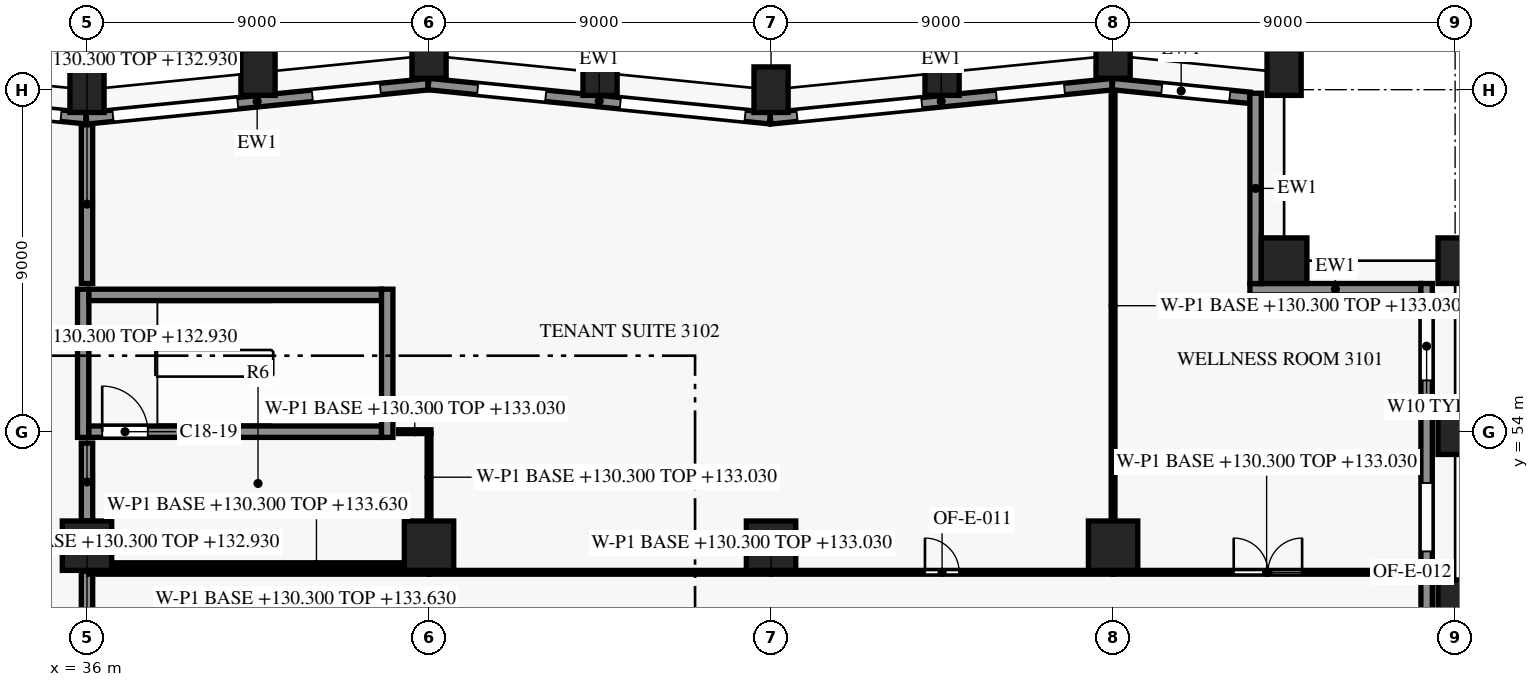
"""IFC4 building model, lengths in metres.
Left out: names, types, materials, properties, quantities, classifications, styles, units other than length and angle.
Written with IfcOpenShell. Run it as: python <this file> out.ifc"""

import sys

from ifc_helpers import new_model, si_unit, direction, frame, frame_2d, origin, origin_2d, place, context, subcontext, project, spatial, rectangle, extrude, element, fill, save


model = new_model("IFC4")
c1 = context("Model", 3, precision=1e-05, world=origin(), true_north=direction((0.0, 1.0)))
c2 = subcontext(c1, "Body", "Model", "MODEL_VIEW")
j1 = project(units=[si_unit("LENGTHUNIT", "METRE"), si_unit("PLANEANGLEUNIT", "RADIAN")], contexts=[c1])
p1 = place(None, origin())
s1 = spatial("IfcSite", under=j1, at=p1, CompositionType="ELEMENT")
p2 = place(p1, origin())
s2 = spatial("IfcBuilding", under=s1, at=p2, CompositionType="ELEMENT")
p3 = place(p2, frame((0.0, 0.0, 130.3)))
s3 = spatial("IfcBuildingStorey", under=s2, at=p3, CompositionType="ELEMENT", Elevation=130.3)
for number, where, z_axis, x_axis in (
    (1, (72.0, 49.5, 0.0), (0.0, 0.0, 1.0), (0.0, 1.0, 0.0)),
    (2, (72.0, 54.0, 0.0), (0.0, 0.0, 1.0), (0.0, 1.0, 0.0)),
    (3, (72.0, 58.5, 0.0), (0.0, 0.0, 1.0), (0.0, 1.0, 0.0)),
    (4, (67.5, 63.45, 0.0), (0.0, 0.0, 1.0), (-0.995, 0.1, 0.0)),
    (5, (63.0, 63.9, 0.0), (0.0, 0.0, 1.0), (-1.0, 0.0, 0.0)),
    (6, (58.5, 63.45, 0.0), (0.0, 0.0, 1.0), (-0.995, -0.1, 0.0)),
    (7, (54.0, 63.0, 0.0), (0.0, 0.0, 1.0), (-1.0, 0.0, 0.0)),
    (8, (49.5, 63.45, 0.0), (0.0, 0.0, 1.0), (-0.995, 0.1, 0.0)),
    (9, (45.0, 63.9, 0.0), (0.0, 0.0, 1.0), (-1.0, 0.0, 0.0)),
    (10, (40.5, 63.45, 0.0), (0.0, 0.0, 1.0), (-0.995, -0.1, 0.0)),
    (11, (36.0, 63.0, 0.0), (0.0, 0.0, 1.0), (-1.0, 0.0, 0.0)),
):
    element("IfcColumn", number, at=place(p3, frame(where, z_axis=z_axis, x_axis=x_axis)), inside=s3, PredefinedType="COLUMN", context=c2, shape_type="SweptSolid", body=[
        extrude(rectangle(XDim=0.9, YDim=1.2, at=origin_2d()), origin(), (0.0, 0.0, 1.0), 3.8),
    ])
p4 = place(p3, frame((67.5, 58.5, 0.0), z_axis=(0.0, 0.0, 1.0), x_axis=(1.0, 0.0, 0.0)))
e12 = element("IfcColumn", 12, at=p4, inside=s3, PredefinedType="COLUMN", context=c2, shape_type="SweptSolid", body=[
    extrude(rectangle(XDim=1.2, YDim=1.2, at=origin_2d()), origin(), (0.0, 0.0, 1.0), 3.8),
])
for number, where, z_axis, x_axis in (
    (13, (36.0, 51.0, 0.0), (0.0, 0.0, 1.0), (1.0, 0.0, 0.0)),
    (14, (45.0, 51.0, 0.0), (0.0, 0.0, 1.0), (1.0, 0.0, 0.0)),
    (15, (54.0, 51.0, 0.0), (0.0, 0.0, 1.0), (1.0, 0.0, 0.0)),
    (16, (63.0, 51.0, 0.0), (0.0, 0.0, 1.0), (1.0, 0.0, 0.0)),
):
    element("IfcColumn", number, at=place(p3, frame(where, z_axis=z_axis, x_axis=x_axis)), inside=s3, PredefinedType="COLUMN", context=c2, shape_type="SweptSolid", body=[
        extrude(rectangle(XDim=1.3, YDim=1.3, at=origin_2d()), origin(), (0.0, 0.0, 1.0), 3.8),
    ])
p5 = place(p3, frame((71.25, 57.9, 0.0), z_axis=(0.0, 0.0, 1.0), x_axis=(0.0, -1.0, 0.0)))
e17 = element("IfcWall", 17, at=p5, inside=s3, PredefinedType="SOLIDWALL", context=c2, shape_type="SweptSolid", body=[
    extrude(rectangle(XDim=25.502, YDim=0.3, at=frame_2d((12.751, 0.0))), origin(), (0.0, 0.0, 1.0), 3.15),
])
p6 = place(p5, frame((0.75, 0.0, 0.75)))
e18 = element("IfcOpeningElement", 18, at=p6, cuts=e17, PredefinedType="OPENING", context=c2, shape_type="SweptSolid", body=[
    extrude(rectangle(XDim=1.8, YDim=1.8, at=frame_2d((0.9, 0.9))), frame((0.0, 0.16, 0.0), z_axis=(0.0, -1.0, 0.0), x_axis=(1.0, 0.0, 0.0)), (0.0, 0.0, 1.0), 0.32),
])
p7 = place(p5, frame((5.25, 0.0, 0.75)))
e19 = element("IfcOpeningElement", 19, at=p7, cuts=e17, PredefinedType="OPENING", context=c2, shape_type="SweptSolid", body=[
    extrude(rectangle(XDim=1.8, YDim=1.8, at=frame_2d((0.9, 0.9))), frame((0.0, 0.16, 0.0), z_axis=(0.0, -1.0, 0.0), x_axis=(1.0, 0.0, 0.0)), (0.0, 0.0, 1.0), 0.32),
])
p8 = place(p5, frame((9.0, 0.0, 0.15)))
e20 = element("IfcOpeningElement", 20, at=p8, cuts=e17, PredefinedType="OPENING", context=c2, shape_type="SweptSolid", body=[
    extrude(rectangle(XDim=3.3, YDim=2.4, at=frame_2d((1.65, 1.2))), frame((0.0, 0.16, 0.0), z_axis=(0.0, -1.0, 0.0), x_axis=(1.0, 0.0, 0.0)), (0.0, 0.0, 1.0), 0.32),
])
p9 = place(p5, frame((13.5, 0.0, 0.15)))
e21 = element("IfcOpeningElement", 21, at=p9, cuts=e17, PredefinedType="OPENING", context=c2, shape_type="SweptSolid", body=[
    extrude(rectangle(XDim=3.3, YDim=2.4, at=frame_2d((1.65, 1.2))), frame((0.0, 0.16, 0.0), z_axis=(0.0, -1.0, 0.0), x_axis=(1.0, 0.0, 0.0)), (0.0, 0.0, 1.0), 0.32),
])
p10 = place(p5, frame((18.75, 0.0, 0.75)))
e22 = element("IfcOpeningElement", 22, at=p10, cuts=e17, PredefinedType="OPENING", context=c2, shape_type="SweptSolid", body=[
    extrude(rectangle(XDim=1.8, YDim=1.8, at=frame_2d((0.9, 0.9))), frame((0.0, 0.16, 0.0), z_axis=(0.0, -1.0, 0.0), x_axis=(1.0, 0.0, 0.0)), (0.0, 0.0, 1.0), 0.32),
])
p11 = place(p5, frame((23.25, 0.0, 0.75)))
e23 = element("IfcOpeningElement", 23, at=p11, cuts=e17, PredefinedType="OPENING", context=c2, shape_type="SweptSolid", body=[
    extrude(rectangle(XDim=1.8, YDim=1.8, at=frame_2d((0.9, 0.9))), frame((0.0, 0.16, 0.0), z_axis=(0.0, -1.0, 0.0), x_axis=(1.0, 0.0, 0.0)), (0.0, 0.0, 1.0), 0.32),
])
p12 = place(p3, frame((66.6, 57.75, 0.0), z_axis=(0.0, 0.0, 1.0), x_axis=(1.0, 0.0, 0.0)))
e24 = element("IfcWall", 24, at=p12, inside=s3, PredefinedType="SOLIDWALL", context=c2, shape_type="SweptSolid", body=[
    extrude(rectangle(XDim=4.5, YDim=0.3, at=frame_2d((2.25, 0.0))), origin(), (0.0, 0.0, 1.0), 3.15),
])
p13 = place(p3, frame((66.75, 62.907, 0.0), z_axis=(0.0, 0.0, 1.0), x_axis=(0.0, -1.0, 0.0)))
e25 = element("IfcWall", 25, at=p13, inside=s3, PredefinedType="SOLIDWALL", context=c2, shape_type="SweptSolid", body=[
    extrude(rectangle(XDim=5.009, YDim=0.3, at=frame_2d((2.504, 0.0))), origin(), (0.0, 0.0, 1.0), 3.15),
])
p14 = place(p3, frame((62.985, 63.148, 0.0), z_axis=(0.0, 0.0, 1.0), x_axis=(0.995038521274, -0.099490407478, 0.0)))
e26 = element("IfcWall", 26, at=p14, inside=s3, PredefinedType="SOLIDWALL", context=c2, shape_type="SweptSolid", body=[
    extrude(rectangle(XDim=3.632, YDim=0.3, at=frame_2d((1.816, 0.0))), origin(), (0.0, 0.0, 1.0), 3.15),
])
p15 = place(p14, frame((1.301, 0.0, 0.75)))
e27 = element("IfcOpeningElement", 27, at=p15, cuts=e26, PredefinedType="OPENING", context=c2, shape_type="SweptSolid", body=[
    extrude(rectangle(XDim=1.8, YDim=1.8, at=frame_2d((0.9, 0.9))), frame((0.0, 0.16, 0.0), z_axis=(0.0, -1.0, 0.0), x_axis=(1.0, 0.0, 0.0)), (0.0, 0.0, 1.0), 0.32),
])
p16 = place(p3, frame((53.985, 62.245, 0.0), z_axis=(0.0, 0.0, 1.0), x_axis=(0.995037993253, 0.099495688264, 0.0)))
e28 = element("IfcWall", 28, at=p16, inside=s3, PredefinedType="SOLIDWALL", context=c2, shape_type="SweptSolid", body=[
    extrude(rectangle(XDim=9.03, YDim=0.3, at=frame_2d((4.515, 0.0))), origin(), (0.0, 0.0, 1.0), 3.15),
])
p17 = place(p16, frame((0.701, 0.0, 0.15)))
e29 = element("IfcOpeningElement", 29, at=p17, cuts=e28, PredefinedType="OPENING", context=c2, shape_type="SweptSolid", body=[
    extrude(rectangle(XDim=3.3, YDim=2.4, at=frame_2d((1.65, 1.2))), frame((0.0, 0.16, 0.0), z_axis=(0.0, -1.0, 0.0), x_axis=(1.0, 0.0, 0.0)), (0.0, 0.0, 1.0), 0.32),
])
p18 = place(p16, frame((5.974, 0.0, 0.75)))
e30 = element("IfcOpeningElement", 30, at=p18, cuts=e28, PredefinedType="OPENING", context=c2, shape_type="SweptSolid", body=[
    extrude(rectangle(XDim=1.8, YDim=1.8, at=frame_2d((0.9, 0.9))), frame((0.0, 0.16, 0.0), z_axis=(0.0, -1.0, 0.0), x_axis=(1.0, 0.0, 0.0)), (0.0, 0.0, 1.0), 0.32),
])
p19 = place(p3, frame((44.985, 63.148, 0.0), z_axis=(0.0, 0.0, 1.0), x_axis=(0.995037993253, -0.099495688264, 0.0)))
e31 = element("IfcWall", 31, at=p19, inside=s3, PredefinedType="SOLIDWALL", context=c2, shape_type="SweptSolid", body=[
    extrude(rectangle(XDim=9.03, YDim=0.3, at=frame_2d((4.515, 0.0))), origin(), (0.0, 0.0, 1.0), 3.15),
])
p20 = place(p19, frame((1.301, 0.0, 0.75)))
e32 = element("IfcOpeningElement", 32, at=p20, cuts=e31, PredefinedType="OPENING", context=c2, shape_type="SweptSolid", body=[
    extrude(rectangle(XDim=1.8, YDim=1.8, at=frame_2d((0.9, 0.9))), frame((0.0, 0.16, 0.0), z_axis=(0.0, -1.0, 0.0), x_axis=(1.0, 0.0, 0.0)), (0.0, 0.0, 1.0), 0.32),
])
p21 = place(p19, frame((5.073, 0.0, 0.15)))
e33 = element("IfcOpeningElement", 33, at=p21, cuts=e31, PredefinedType="OPENING", context=c2, shape_type="SweptSolid", body=[
    extrude(rectangle(XDim=3.3, YDim=2.4, at=frame_2d((1.65, 1.2))), frame((0.0, 0.16, 0.0), z_axis=(0.0, -1.0, 0.0), x_axis=(1.0, 0.0, 0.0)), (0.0, 0.0, 1.0), 0.32),
])
p22 = place(p3, frame((35.985, 62.245, 0.0), z_axis=(0.0, 0.0, 1.0), x_axis=(0.995037993253, 0.099495688264, 0.0)))
e34 = element("IfcWall", 34, at=p22, inside=s3, PredefinedType="SOLIDWALL", context=c2, shape_type="SweptSolid", body=[
    extrude(rectangle(XDim=9.03, YDim=0.3, at=frame_2d((4.515, 0.0))), origin(), (0.0, 0.0, 1.0), 3.15),
])
p23 = place(p22, frame((0.701, 0.0, 0.15)))
e35 = element("IfcOpeningElement", 35, at=p23, cuts=e34, PredefinedType="OPENING", context=c2, shape_type="SweptSolid", body=[
    extrude(rectangle(XDim=3.3, YDim=2.4, at=frame_2d((1.65, 1.2))), frame((0.0, 0.16, 0.0), z_axis=(0.0, -1.0, 0.0), x_axis=(1.0, 0.0, 0.0)), (0.0, 0.0, 1.0), 0.32),
])
p24 = place(p22, frame((5.974, 0.0, 0.75)))
e36 = element("IfcOpeningElement", 36, at=p24, cuts=e34, PredefinedType="OPENING", context=c2, shape_type="SweptSolid", body=[
    extrude(rectangle(XDim=1.8, YDim=1.8, at=frame_2d((0.9, 0.9))), frame((0.0, 0.16, 0.0), z_axis=(0.0, -1.0, 0.0), x_axis=(1.0, 0.0, 0.0)), (0.0, 0.0, 1.0), 0.32),
])
p25 = place(p3, frame((27.075, 63.139, 0.0), z_axis=(0.0, 0.0, 1.0), x_axis=(0.995036108601, -0.099514534519, 0.0)))
e37 = element("IfcWall", 37, at=p25, inside=s3, PredefinedType="SOLIDWALL", context=c2, shape_type="SweptSolid", body=[
    extrude(rectangle(XDim=8.94, YDim=0.3, at=frame_2d((4.47, 0.0))), origin(), (0.0, 0.0, 1.0), 3.15),
])
p26 = place(p25, frame((1.211, 0.0, 0.75)))
e38 = element("IfcOpeningElement", 38, at=p26, cuts=e37, PredefinedType="OPENING", context=c2, shape_type="SweptSolid", body=[
    extrude(rectangle(XDim=1.8, YDim=1.8, at=frame_2d((0.9, 0.9))), frame((0.0, 0.16, 0.0), z_axis=(0.0, -1.0, 0.0), x_axis=(1.0, 0.0, 0.0)), (0.0, 0.0, 1.0), 0.32),
])
p27 = place(p25, frame((4.984, 0.0, 0.15)))
e39 = element("IfcOpeningElement", 39, at=p27, cuts=e37, PredefinedType="OPENING", context=c2, shape_type="SweptSolid", body=[
    extrude(rectangle(XDim=3.3, YDim=2.4, at=frame_2d((1.65, 1.2))), frame((0.0, 0.16, 0.0), z_axis=(0.0, -1.0, 0.0), x_axis=(1.0, 0.0, 0.0)), (0.0, 0.0, 1.0), 0.32),
])
p28 = place(p3, frame((36.05, 54.0, 0.0), z_axis=(0.0, 0.0, 1.0), x_axis=(1.0, 0.0, 0.0)))
e40 = element("IfcWall", 40, at=p28, inside=s3, PredefinedType="SHEAR", context=c2, shape_type="SweptSolid", body=[
    extrude(rectangle(XDim=7.7, YDim=0.3, at=frame_2d((3.85, 0.0))), origin(), (0.0, 0.0, 1.0), 3.5),
])
p29 = place(p28, frame((0.35, 0.0, 0.0)))
e41 = element("IfcOpeningElement", 41, at=p29, cuts=e40, PredefinedType="OPENING", context=c2, shape_type="SweptSolid", body=[
    extrude(rectangle(XDim=1.2, YDim=2.2, at=frame_2d((0.6, 1.1))), frame((0.0, 0.16, 0.0), z_axis=(0.0, -1.0, 0.0), x_axis=(1.0, 0.0, 0.0)), (0.0, 0.0, 1.0), 0.32),
])
p30 = place(p3, frame((36.05, 57.6, 0.0), z_axis=(0.0, 0.0, 1.0), x_axis=(1.0, 0.0, 0.0)))
e42 = element("IfcWall", 42, at=p30, inside=s3, PredefinedType="SHEAR", context=c2, shape_type="SweptSolid", body=[
    extrude(rectangle(XDim=7.7, YDim=0.3, at=frame_2d((3.85, 0.0))), origin(), (0.0, 0.0, 1.0), 3.5),
])
for number, where, z_axis, x_axis in (
    (43, (35.9, 53.85, 0.0), (0.0, 0.0, 1.0), (0.0, 1.0, 0.0)),
    (44, (43.9, 53.85, 0.0), (0.0, 0.0, 1.0), (0.0, 1.0, 0.0)),
):
    element("IfcWall", number, at=place(p3, frame(where, z_axis=z_axis, x_axis=x_axis)), inside=s3, PredefinedType="SHEAR", context=c2, shape_type="SweptSolid", body=[
        extrude(rectangle(XDim=3.9, YDim=0.3, at=frame_2d((1.95, 0.0))), origin(), (0.0, 0.0, 1.0), 3.5),
    ])
p31 = place(p3, frame((36.0, 48.05, 0.0), z_axis=(0.0, 0.0, 1.0), x_axis=(0.0, 1.0, 0.0)))
e45 = element("IfcWall", 45, at=p31, inside=s3, PredefinedType="PARTITIONING", context=c2, shape_type="SweptSolid", body=[
    extrude(rectangle(XDim=2.28, YDim=0.3, at=frame_2d((1.14, 0.0))), origin(), (0.0, 0.0, 1.0), 2.63),
])
p32 = place(p3, frame((36.05, 50.3, 0.0), z_axis=(0.0, 0.0, 1.0), x_axis=(1.0, 0.0, 0.0)))
e46 = element("IfcWall", 46, at=p32, inside=s3, PredefinedType="PARTITIONING", context=c2, shape_type="SweptSolid", body=[
    extrude(rectangle(XDim=8.95, YDim=0.1, at=frame_2d((4.475, 0.0))), origin(), (0.0, 0.0, 1.0), 2.63),
])
p33 = place(p3, frame((45.0, 50.3, 0.0), z_axis=(0.0, 0.0, 1.0), x_axis=(1.0, 0.0, 0.0)))
e47 = element("IfcWall", 47, at=p33, inside=s3, PredefinedType="PARTITIONING", context=c2, shape_type="SweptSolid", body=[
    extrude(rectangle(XDim=18.0, YDim=0.1, at=frame_2d((9.0, 0.0))), origin(), (0.0, 0.0, 1.0), 2.73),
])
p34 = place(p33, frame((13.05, 0.0, 0.0)))
e48 = element("IfcOpeningElement", 48, at=p34, cuts=e47, PredefinedType="OPENING", context=c2, shape_type="SweptSolid", body=[
    extrude(rectangle(XDim=0.9, YDim=2.1, at=frame_2d((0.45, 1.05))), frame((0.0, 0.06, 0.0), z_axis=(0.0, -1.0, 0.0), x_axis=(1.0, 0.0, 0.0)), (0.0, 0.0, 1.0), 0.12),
])
p35 = place(p3, frame((63.0, 50.3, 0.0), z_axis=(0.0, 0.0, 1.0), x_axis=(1.0, 0.0, 0.0)))
e49 = element("IfcWall", 49, at=p35, inside=s3, PredefinedType="PARTITIONING", context=c2, shape_type="SweptSolid", body=[
    extrude(rectangle(XDim=8.08, YDim=0.1, at=frame_2d((4.04, 0.0))), origin(), (0.0, 0.0, 1.0), 2.73),
])
p36 = place(p35, frame((3.174, 0.0, 0.0)))
e50 = element("IfcOpeningElement", 50, at=p36, cuts=e49, PredefinedType="OPENING", context=c2, shape_type="SweptSolid", body=[
    extrude(rectangle(XDim=1.8, YDim=2.1, at=frame_2d((0.9, 1.05))), frame((0.0, 0.06, 0.0), z_axis=(0.0, -1.0, 0.0), x_axis=(1.0, 0.0, 0.0)), (0.0, 0.0, 1.0), 0.12),
])
p37 = place(p3, frame((44.345, 50.5, 0.0), z_axis=(0.0, 0.0, 1.0), x_axis=(-1.0, 0.0, 0.0)))
e51 = element("IfcWall", 51, at=p37, inside=s3, PredefinedType="PARTITIONING", context=c2, shape_type="SweptSolid", body=[
    extrude(rectangle(XDim=7.69, YDim=0.1, at=frame_2d((3.845, 0.0))), origin(), (0.0, 0.0, 1.0), 3.33),
])
p38 = place(p3, frame((36.0, 51.655, 0.0), z_axis=(0.0, 0.0, 1.0), x_axis=(0.0, 1.0, 0.0)))
e52 = element("IfcWall", 52, at=p38, inside=s3, PredefinedType="PARTITIONING", context=c2, shape_type="SweptSolid", body=[
    extrude(rectangle(XDim=2.045, YDim=0.3, at=frame_2d((1.022, 0.0))), origin(), (0.0, 0.0, 1.0), 2.63),
])
p39 = place(p3, frame((45.0, 53.95, 0.0), z_axis=(0.0, 0.0, 1.0), x_axis=(0.0, -1.0, 0.0)))
e53 = element("IfcWall", 53, at=p39, inside=s3, PredefinedType="PARTITIONING", context=c2, shape_type="SweptSolid", body=[
    extrude(rectangle(XDim=2.295, YDim=0.1, at=frame_2d((1.147, 0.0))), origin(), (0.0, 0.0, 1.0), 2.73),
])
p40 = place(p3, frame((44.2, 54.0, 0.0), z_axis=(0.0, 0.0, 1.0), x_axis=(1.0, 0.0, 0.0)))
e54 = element("IfcWall", 54, at=p40, inside=s3, PredefinedType="PARTITIONING", context=c2, shape_type="SweptSolid", body=[
    extrude(rectangle(XDim=0.85, YDim=0.1, at=frame_2d((0.425, 0.0))), origin(), (0.0, 0.0, 1.0), 2.73),
])
p41 = place(p3, frame((36.0, 57.9, 0.0), z_axis=(0.0, 0.0, 1.0), x_axis=(0.0, 1.0, 0.0)))
e55 = element("IfcWall", 55, at=p41, inside=s3, PredefinedType="PARTITIONING", context=c2, shape_type="SweptSolid", body=[
    extrude(rectangle(XDim=4.176, YDim=0.3, at=frame_2d((2.088, 0.0))), origin(), (0.0, 0.0, 1.0), 2.63),
])
p42 = place(p3, frame((63.0, 62.976, 0.0), z_axis=(0.0, 0.0, 1.0), x_axis=(0.0, -1.0, 0.0)))
e56 = element("IfcWall", 56, at=p42, inside=s3, PredefinedType="PARTITIONING", context=c2, shape_type="SweptSolid", body=[
    extrude(rectangle(XDim=11.321, YDim=0.1, at=frame_2d((5.66, 0.0))), origin(), (0.0, 0.0, 1.0), 2.73),
])
p43 = place(p6, origin())
e57 = element("IfcWindow", 57, at=p43, inside=s3, PartitioningType="SINGLE_PANEL", PredefinedType="WINDOW", context=c2, shape_type="SweptSolid", body=[
    extrude(rectangle(XDim=1.8, YDim=1.8, at=frame_2d((0.9, 0.9))), frame((0.0, 0.03, 0.0), z_axis=(0.0, -1.0, 0.0), x_axis=(1.0, 0.0, 0.0)), (0.0, 0.0, 1.0), 0.06),
])
fill(e18, e57)
p44 = place(p7, origin())
e58 = element("IfcWindow", 58, at=p44, inside=s3, PartitioningType="SINGLE_PANEL", PredefinedType="WINDOW", context=c2, shape_type="SweptSolid", body=[
    extrude(rectangle(XDim=1.8, YDim=1.8, at=frame_2d((0.9, 0.9))), frame((0.0, 0.03, 0.0), z_axis=(0.0, -1.0, 0.0), x_axis=(1.0, 0.0, 0.0)), (0.0, 0.0, 1.0), 0.06),
])
fill(e19, e58)
p45 = place(p15, origin())
e59 = element("IfcWindow", 59, at=p45, inside=s3, PartitioningType="SINGLE_PANEL", PredefinedType="WINDOW", context=c2, shape_type="SweptSolid", body=[
    extrude(rectangle(XDim=1.8, YDim=1.8, at=frame_2d((0.9, 0.9))), frame((0.0, 0.03, 0.0), z_axis=(0.0, -1.0, 0.0), x_axis=(1.0, 0.0, 0.0)), (0.0, 0.0, 1.0), 0.06),
])
fill(e27, e59)
p46 = place(p17, origin())
e60 = element("IfcWindow", 60, at=p46, inside=s3, PartitioningType="SINGLE_PANEL", PredefinedType="WINDOW", context=c2, shape_type="SweptSolid", body=[
    extrude(rectangle(XDim=3.3, YDim=2.4, at=frame_2d((1.65, 1.2))), frame((0.0, 0.03, 0.0), z_axis=(0.0, -1.0, 0.0), x_axis=(1.0, 0.0, 0.0)), (0.0, 0.0, 1.0), 0.06),
])
fill(e29, e60)
p47 = place(p18, origin())
e61 = element("IfcWindow", 61, at=p47, inside=s3, PartitioningType="SINGLE_PANEL", PredefinedType="WINDOW", context=c2, shape_type="SweptSolid", body=[
    extrude(rectangle(XDim=1.8, YDim=1.8, at=frame_2d((0.9, 0.9))), frame((0.0, 0.03, 0.0), z_axis=(0.0, -1.0, 0.0), x_axis=(1.0, 0.0, 0.0)), (0.0, 0.0, 1.0), 0.06),
])
fill(e30, e61)
p48 = place(p20, origin())
e62 = element("IfcWindow", 62, at=p48, inside=s3, PartitioningType="SINGLE_PANEL", PredefinedType="WINDOW", context=c2, shape_type="SweptSolid", body=[
    extrude(rectangle(XDim=1.8, YDim=1.8, at=frame_2d((0.9, 0.9))), frame((0.0, 0.03, 0.0), z_axis=(0.0, -1.0, 0.0), x_axis=(1.0, 0.0, 0.0)), (0.0, 0.0, 1.0), 0.06),
])
fill(e32, e62)
p49 = place(p21, origin())
e63 = element("IfcWindow", 63, at=p49, inside=s3, PartitioningType="SINGLE_PANEL", PredefinedType="WINDOW", context=c2, shape_type="SweptSolid", body=[
    extrude(rectangle(XDim=3.3, YDim=2.4, at=frame_2d((1.65, 1.2))), frame((0.0, 0.03, 0.0), z_axis=(0.0, -1.0, 0.0), x_axis=(1.0, 0.0, 0.0)), (0.0, 0.0, 1.0), 0.06),
])
fill(e33, e63)
p50 = place(p23, origin())
e64 = element("IfcWindow", 64, at=p50, inside=s3, PartitioningType="SINGLE_PANEL", PredefinedType="WINDOW", context=c2, shape_type="SweptSolid", body=[
    extrude(rectangle(XDim=3.3, YDim=2.4, at=frame_2d((1.65, 1.2))), frame((0.0, 0.03, 0.0), z_axis=(0.0, -1.0, 0.0), x_axis=(1.0, 0.0, 0.0)), (0.0, 0.0, 1.0), 0.06),
])
fill(e35, e64)
p51 = place(p24, origin())
e65 = element("IfcWindow", 65, at=p51, inside=s3, PartitioningType="SINGLE_PANEL", PredefinedType="WINDOW", context=c2, shape_type="SweptSolid", body=[
    extrude(rectangle(XDim=1.8, YDim=1.8, at=frame_2d((0.9, 0.9))), frame((0.0, 0.03, 0.0), z_axis=(0.0, -1.0, 0.0), x_axis=(1.0, 0.0, 0.0)), (0.0, 0.0, 1.0), 0.06),
])
fill(e36, e65)
p52 = place(p27, origin())
e66 = element("IfcWindow", 66, at=p52, inside=s3, PartitioningType="SINGLE_PANEL", PredefinedType="WINDOW", context=c2, shape_type="SweptSolid", body=[
    extrude(rectangle(XDim=3.3, YDim=2.4, at=frame_2d((1.65, 1.2))), frame((0.0, 0.03, 0.0), z_axis=(0.0, -1.0, 0.0), x_axis=(1.0, 0.0, 0.0)), (0.0, 0.0, 1.0), 0.06),
])
fill(e39, e66)
p53 = place(p29, origin())
e67 = element("IfcDoor", 67, at=p53, inside=s3, OperationType="SINGLE_SWING_LEFT", PredefinedType="DOOR", context=c2, shape_type="SweptSolid", body=[
    extrude(rectangle(XDim=1.2, YDim=2.2, at=frame_2d((0.6, 1.1))), frame((0.0, 0.025, 0.0), z_axis=(0.0, -1.0, 0.0), x_axis=(1.0, 0.0, 0.0)), (0.0, 0.0, 1.0), 0.05),
])
fill(e41, e67)
p54 = place(p34, origin())
e68 = element("IfcDoor", 68, at=p54, inside=s3, OperationType="SINGLE_SWING_LEFT", PredefinedType="DOOR", context=c2, shape_type="SweptSolid", body=[
    extrude(rectangle(XDim=0.9, YDim=2.1, at=frame_2d((0.45, 1.05))), frame((0.0, 0.025, 0.0), z_axis=(0.0, -1.0, 0.0), x_axis=(1.0, 0.0, 0.0)), (0.0, 0.0, 1.0), 0.05),
])
fill(e48, e68)
p55 = place(p36, origin())
e69 = element("IfcDoor", 69, at=p55, inside=s3, OperationType="DOUBLE_DOOR_SINGLE_SWING", PredefinedType="DOOR", context=c2, shape_type="SweptSolid", body=[
    extrude(rectangle(XDim=1.8, YDim=2.1, at=frame_2d((0.9, 1.05))), frame((0.0, 0.025, 0.0), z_axis=(0.0, -1.0, 0.0), x_axis=(1.0, 0.0, 0.0)), (0.0, 0.0, 1.0), 0.05),
])
fill(e50, e69)
save(model, sys.argv[1])
